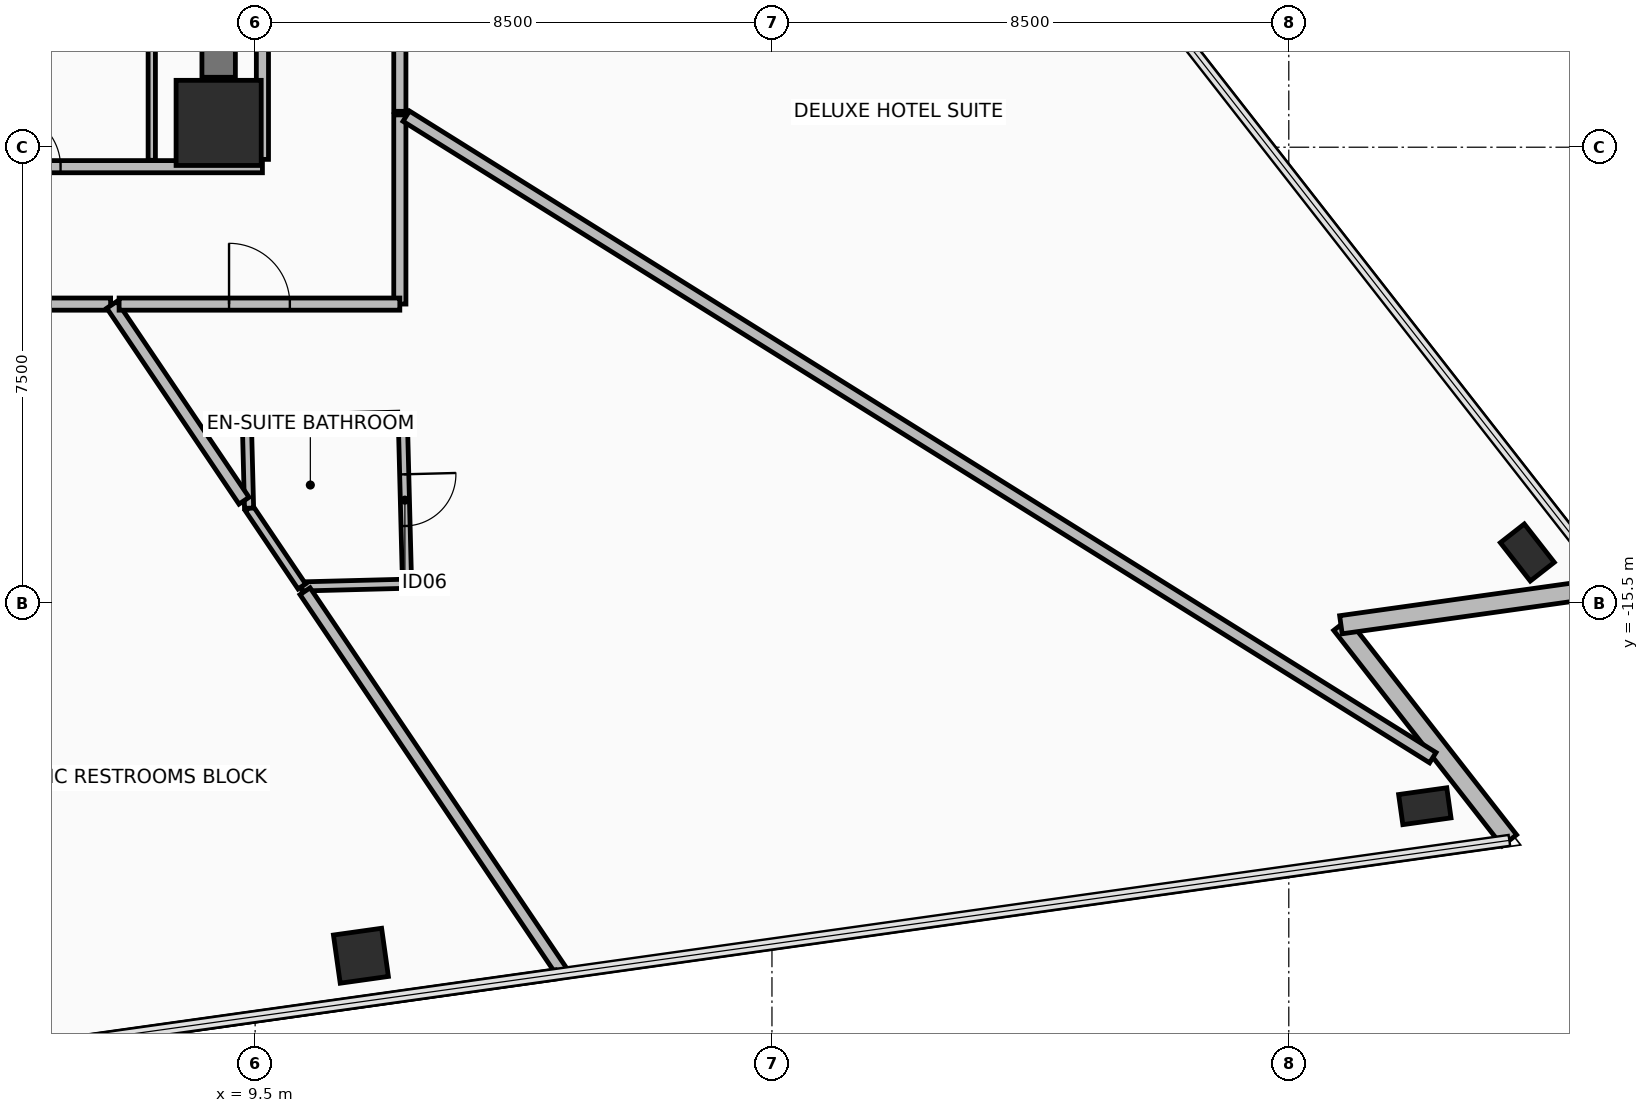
"""IFC4 building model, lengths in metres.
Left out: names, types, materials, properties, quantities, classifications, styles, units other than length and angle.
Written with IfcOpenShell. Run it as: python <this file> out.ifc"""

import sys

from ifc_helpers import new_model, si_unit, direction, frame, frame_2d, origin, origin_2d, place, context, subcontext, project, spatial, rectangle, hollow_rectangle, extrude, element, fill, save


model = new_model("IFC4")
c1 = context("Model", 3, precision=1e-05, world=origin(), true_north=direction((0.0, 1.0)))
c2 = subcontext(c1, "Body", "Model", "MODEL_VIEW")
j1 = project(units=[si_unit("LENGTHUNIT", "METRE"), si_unit("PLANEANGLEUNIT", "RADIAN")], contexts=[c1])
p1 = place(None, origin())
s1 = spatial("IfcSite", under=j1, at=p1, CompositionType="ELEMENT")
p2 = place(p1, origin())
s2 = spatial("IfcBuilding", under=s1, at=p2, CompositionType="ELEMENT")
p3 = place(p2, frame((0.0, 0.0, 77.65)))
s3 = spatial("IfcBuildingStorey", under=s2, at=p3, CompositionType="ELEMENT", Elevation=77.65)
p4 = place(p3, frame((8.9, -7.6, 0.0), z_axis=(0.0, 0.0, 1.0), x_axis=(1.0, 0.0, 0.0)))
e1 = element("IfcColumn", 1, at=p4, inside=s3, PredefinedType="COLUMN", context=c2, shape_type="SweptSolid", body=[
    extrude(rectangle(XDim=1.4, YDim=1.4, at=origin_2d()), origin(), (0.0, 0.0, 1.0), 3.45),
])
p5 = place(p3, frame((11.24, -21.296, 0.0), z_axis=(0.0, 0.0, 1.0), x_axis=(0.990268068742, 0.13917310096, 0.0)))
e2 = element("IfcColumn", 2, at=p5, inside=s3, PredefinedType="COLUMN", context=c2, shape_type="SweptSolid", body=[
    extrude(hollow_rectangle(XDim=0.8, YDim=0.8, WallThickness=0.045, at=origin_2d()), origin(), (0.0, 0.0, 1.0), 3.45),
])
for number, where, z_axis, x_axis in (
    (3, (28.737, -18.837, 0.0), (0.0, 0.0, 1.0), (0.99, 0.139, 0.0)),
    (4, (30.423, -14.665, 0.0), (0.0, 0.0, 1.0), (-0.616, 0.788, 0.0)),
):
    element("IfcColumn", number, at=place(p3, frame(where, z_axis=z_axis, x_axis=x_axis)), inside=s3, PredefinedType="COLUMN", context=c2, shape_type="SweptSolid", body=[
        extrude(hollow_rectangle(XDim=0.5, YDim=0.8, WallThickness=0.04, at=origin_2d()), origin(), (0.0, 0.0, 1.0), 3.45),
    ])
p6 = place(p3, frame((30.128, -19.399, 0.0), z_axis=(0.0, 0.0, 1.0), x_axis=(-0.615621932091, 0.78804164657, 0.0)))
e5 = element("IfcWall", 5, at=p6, inside=s3, PredefinedType="STANDARD", context=c2, shape_type="SweptSolid", body=[
    extrude(rectangle(XDim=4.5, YDim=0.3, at=frame_2d((2.25, 0.0))), origin(), (0.0, 0.0, 1.0), 2.405),
])
p7 = place(p3, frame((27.357, -15.853, 0.0), z_axis=(0.0, 0.0, 1.0), x_axis=(0.990269200152, 0.139165050317, 0.0)))
e6 = element("IfcWall", 6, at=p7, inside=s3, PredefinedType="STANDARD", context=c2, shape_type="SweptSolid", body=[
    extrude(rectangle(XDim=4.5, YDim=0.3, at=frame_2d((2.25, 0.0))), origin(), (0.0, 0.0, 1.0), 2.405),
])
p8 = place(p3, frame((8.9, -6.85, 0.0), z_axis=(0.0, 0.0, 1.0), x_axis=(0.0, 1.0, 0.0)))
e7 = element("IfcWall", 7, at=p8, inside=s3, PredefinedType="SHEAR", context=c2, shape_type="SweptSolid", body=[
    extrude(rectangle(XDim=10.7, YDim=0.55, at=frame_2d((5.35, 0.0))), origin(), (0.0, 0.0, 1.0), 3.21),
])
p9 = place(p3, frame((-9.62, -8.32, 0.0), z_axis=(0.0, 0.0, 1.0), x_axis=(1.0, 0.0, 0.0)))
e8 = element("IfcWall", 8, at=p9, inside=s3, PredefinedType="PARTITIONING", context=c2, shape_type="SweptSolid", body=[
    extrude(rectangle(XDim=19.24, YDim=0.2, at=frame_2d((9.62, 0.0))), origin(), (0.0, 0.0, 1.0), 2.605),
])
p10 = place(p9, frame((15.02, 0.0, 0.0)))
e9 = element("IfcOpeningElement", 9, at=p10, cuts=e8, PredefinedType="OPENING", context=c2, shape_type="SweptSolid", body=[
    extrude(rectangle(XDim=0.9, YDim=2.1, at=frame_2d((0.45, 1.05))), frame((0.0, 0.11, 0.0), z_axis=(0.0, -1.0, 0.0), x_axis=(1.0, 0.0, 0.0)), (0.0, 0.0, 1.0), 0.22),
])
p11 = place(p3, frame((9.62, -8.2, 0.0), z_axis=(0.0, 0.0, 1.0), x_axis=(0.0, 1.0, 0.0)))
e10 = element("IfcWall", 10, at=p11, inside=s3, PredefinedType="PARTITIONING", context=c2, shape_type="SweptSolid", body=[
    extrude(rectangle(XDim=16.4, YDim=0.2, at=frame_2d((8.2, 0.0))), origin(), (0.0, 0.0, 1.0), 2.605),
])
p12 = place(p11, frame((12.65, 0.0, 0.0)))
e11 = element("IfcOpeningElement", 11, at=p12, cuts=e10, PredefinedType="OPENING", context=c2, shape_type="SweptSolid", body=[
    extrude(rectangle(XDim=1.1, YDim=2.15, at=frame_2d((0.55, 1.075))), frame((0.0, 0.11, 0.0), z_axis=(0.0, -1.0, 0.0), x_axis=(1.0, 0.0, 0.0)), (0.0, 0.0, 1.0), 0.22),
])
p13 = place(p3, frame((7.8, -8.215, 0.0), z_axis=(0.0, 0.0, 1.0), x_axis=(0.0, 1.0, 0.0)))
e12 = element("IfcWall", 12, at=p13, inside=s3, PredefinedType="PARTITIONING", context=c2, shape_type="SweptSolid", body=[
    extrude(rectangle(XDim=4.015, YDim=0.12, at=frame_2d((2.008, 0.0))), origin(), (0.0, 0.0, 1.0), 2.405),
])
p14 = place(p3, frame((11.927, -12.429, 0.0), z_axis=(0.0, 0.0, 1.0), x_axis=(0.025746347005, -0.999668507864, 0.0)))
e13 = element("IfcWall", 13, at=p14, inside=s3, PredefinedType="PARTITIONING", context=c2, shape_type="SweptSolid", body=[
    extrude(rectangle(XDim=2.75, YDim=0.15, at=frame_2d((1.375, 0.0))), origin(), (0.0, 0.0, 1.0), 2.805),
])
p15 = place(p14, frame((0.95, 0.0, 0.0)))
e14 = element("IfcOpeningElement", 14, at=p15, cuts=e13, PredefinedType="OPENING", context=c2, shape_type="SweptSolid", body=[
    extrude(rectangle(XDim=0.85, YDim=2.1, at=frame_2d((0.425, 1.05))), frame((0.0, 0.085, 0.0), z_axis=(0.0, -1.0, 0.0), x_axis=(1.0, 0.0, 0.0)), (0.0, 0.0, 1.0), 0.17),
])
p16 = place(p3, frame((11.998, -15.178, 0.0), z_axis=(0.0, 0.0, 1.0), x_axis=(-0.999670410654, -0.025672359918, 0.0)))
e15 = element("IfcWall", 15, at=p16, inside=s3, PredefinedType="PARTITIONING", context=c2, shape_type="SweptSolid", body=[
    extrude(rectangle(XDim=1.731, YDim=0.15, at=frame_2d((0.865, 0.0))), origin(), (0.0, 0.0, 1.0), 2.605),
])
p17 = place(p3, frame((10.268, -15.223, 0.0), z_axis=(0.0, 0.0, 1.0), x_axis=(-0.559229675695, 0.82901276819, 0.0)))
e16 = element("IfcWall", 16, at=p17, inside=s3, PredefinedType="PARTITIONING", context=c2, shape_type="SweptSolid", body=[
    extrude(rectangle(XDim=1.552, YDim=0.15, at=frame_2d((0.776, 0.0))), origin(), (0.0, 0.0, 1.0), 2.605),
])
p18 = place(p3, frame((9.4, -13.936, 0.0), z_axis=(0.0, 0.0, 1.0), x_axis=(-0.025745445057, 0.999668531094, 0.0)))
e17 = element("IfcWall", 17, at=p18, inside=s3, PredefinedType="PARTITIONING", context=c2, shape_type="SweptSolid", body=[
    extrude(rectangle(XDim=1.441, YDim=0.15, at=frame_2d((0.721, 0.0))), origin(), (0.0, 0.0, 1.0), 3.21),
])
p19 = place(p3, frame((9.443, -12.493, 0.0), z_axis=(0.0, 0.0, 1.0), x_axis=(0.999667618691, 0.025780848324, 0.0)))
e18 = element("IfcWall", 18, at=p19, inside=s3, PredefinedType="PARTITIONING", context=c2, shape_type="SweptSolid", body=[
    extrude(rectangle(XDim=2.405, YDim=0.15, at=frame_2d((1.203, 0.0))), origin(), (0.0, 0.0, 1.0), 2.605),
])
p20 = place(p3, frame((1.895, -10.58, 0.0), z_axis=(0.0, 0.0, 1.0), x_axis=(1.0, 0.0, 0.0)))
e19 = element("IfcWall", 19, at=p20, inside=s3, PredefinedType="PARTITIONING", context=c2, shape_type="SweptSolid", body=[
    extrude(rectangle(XDim=5.228, YDim=0.2, at=frame_2d((2.614, 0.0))), origin(), (0.0, 0.0, 1.0), 3.21),
])
p21 = place(p20, frame((2.189, 0.0, 0.0)))
e20 = element("IfcOpeningElement", 20, at=p21, cuts=e19, PredefinedType="OPENING", context=c2, shape_type="SweptSolid", body=[
    extrude(rectangle(XDim=0.85, YDim=2.1, at=frame_2d((0.425, 1.05))), frame((0.0, 0.11, 0.0), z_axis=(0.0, -1.0, 0.0), x_axis=(1.0, 0.0, 0.0)), (0.0, 0.0, 1.0), 0.22),
])
p22 = place(p3, frame((7.144, -10.591, 0.0), z_axis=(0.0, 0.0, 1.0), x_axis=(0.559171794076, -0.829051810631, 0.0)))
e21 = element("IfcWall", 21, at=p22, inside=s3, PredefinedType="PARTITIONING", context=c2, shape_type="SweptSolid", body=[
    extrude(rectangle(XDim=3.886, YDim=0.2, at=frame_2d((1.943, 0.0))), origin(), (0.0, 0.0, 1.0), 3.21),
])
p23 = place(p3, frame((10.321, -15.302, 0.0), z_axis=(0.0, 0.0, 1.0), x_axis=(0.559202924042, -0.829030813506, 0.0)))
e22 = element("IfcWall", 22, at=p23, inside=s3, PredefinedType="PARTITIONING", context=c2, shape_type="SweptSolid", body=[
    extrude(rectangle(XDim=7.581, YDim=0.2, at=frame_2d((3.791, 0.0))), origin(), (0.0, 0.0, 1.0), 2.405),
])
p24 = place(p3, frame((14.445, -21.603, 0.0), z_axis=(0.0, 0.0, 1.0), x_axis=(-0.990270056923, -0.139158953581, 0.0)))
e23 = element("IfcWall", 23, at=p24, inside=s3, PredefinedType="PARTITIONING", context=c2, shape_type="SweptSolid", body=[
    extrude(rectangle(XDim=10.456, YDim=0.15, at=frame_2d((5.228, 0.0))), origin(), (0.0, 0.0, 1.0), 3.21),
])
p25 = place(p3, frame((11.88, -10.579, 0.0), z_axis=(0.0, 0.0, 1.0), x_axis=(0.0, 1.0, 0.0)))
e24 = element("IfcWall", 24, at=p25, inside=s3, PredefinedType="PARTITIONING", context=c2, shape_type="SweptSolid", body=[
    extrude(rectangle(XDim=3.111, YDim=0.2, at=frame_2d((1.555, 0.0))), origin(), (0.0, 0.0, 1.0), 2.605),
])
p26 = place(p3, frame((11.985, -7.489, 0.0), z_axis=(0.0, 0.0, 1.0), x_axis=(0.848049281921, -0.529917366608, 0.0)))
e25 = element("IfcWall", 25, at=p26, inside=s3, PredefinedType="PARTITIONING", context=c2, shape_type="SweptSolid", body=[
    extrude(rectangle(XDim=19.908, YDim=0.2, at=frame_2d((9.954, 0.0))), origin(), (0.0, 0.0, 1.0), 2.405),
])
p27 = place(p3, frame((7.263, -10.58, 0.0), z_axis=(0.0, 0.0, 1.0), x_axis=(1.0, 0.0, 0.0)))
e26 = element("IfcWall", 26, at=p27, inside=s3, PredefinedType="PARTITIONING", context=c2, shape_type="SweptSolid", body=[
    extrude(rectangle(XDim=4.616, YDim=0.2, at=frame_2d((2.308, 0.0))), origin(), (0.0, 0.0, 1.0), 2.605),
])
p28 = place(p27, frame((1.808, 0.0, 0.0)))
e27 = element("IfcOpeningElement", 27, at=p28, cuts=e26, PredefinedType="OPENING", context=c2, shape_type="SweptSolid", body=[
    extrude(rectangle(XDim=1.0, YDim=2.15, at=frame_2d((0.5, 1.075))), frame((0.0, 0.11, 0.0), z_axis=(0.0, -1.0, 0.0), x_axis=(1.0, 0.0, 0.0)), (0.0, 0.0, 1.0), 0.22),
])
p29 = place(p3, frame((11.88, -7.41, 0.0), z_axis=(0.0, 0.0, 1.0), x_axis=(0.0, 1.0, 0.0)))
e28 = element("IfcWall", 28, at=p29, inside=s3, PredefinedType="PARTITIONING", context=c2, shape_type="SweptSolid", body=[
    extrude(rectangle(XDim=5.711, YDim=0.2, at=frame_2d((2.855, 0.0))), origin(), (0.0, 0.0, 1.0), 2.605),
])
p30 = place(p29, frame((2.356, 0.0, 0.0)))
e29 = element("IfcOpeningElement", 29, at=p30, cuts=e28, PredefinedType="OPENING", context=c2, shape_type="SweptSolid", body=[
    extrude(rectangle(XDim=1.0, YDim=2.15, at=frame_2d((0.5, 1.075))), frame((0.0, 0.11, 0.0), z_axis=(0.0, -1.0, 0.0), x_axis=(1.0, 0.0, 0.0)), (0.0, 0.0, 1.0), 0.22),
])
p31 = place(p10, origin())
e30 = element("IfcDoor", 30, at=p31, inside=s3, OperationType="SINGLE_SWING_LEFT", PredefinedType="DOOR", context=c2, shape_type="SweptSolid", body=[
    extrude(rectangle(XDim=0.9, YDim=2.1, at=frame_2d((0.45, 1.05))), frame((0.0, 0.025, 0.0), z_axis=(0.0, -1.0, 0.0), x_axis=(1.0, 0.0, 0.0)), (0.0, 0.0, 1.0), 0.05),
])
fill(e9, e30)
p32 = place(p15, origin())
e31 = element("IfcDoor", 31, at=p32, inside=s3, OperationType="SINGLE_SWING_RIGHT", PredefinedType="DOOR", context=c2, shape_type="SweptSolid", body=[
    extrude(rectangle(XDim=0.85, YDim=2.1, at=frame_2d((0.425, 1.05))), frame((0.0, 0.025, 0.0), z_axis=(0.0, -1.0, 0.0), x_axis=(1.0, 0.0, 0.0)), (0.0, 0.0, 1.0), 0.05),
])
fill(e14, e31)
p33 = place(p28, origin())
e32 = element("IfcDoor", 32, at=p33, inside=s3, OperationType="SINGLE_SWING_LEFT", PredefinedType="DOOR", context=c2, shape_type="SweptSolid", body=[
    extrude(rectangle(XDim=1.0, YDim=2.15, at=frame_2d((0.5, 1.075))), frame((0.0, 0.025, 0.0), z_axis=(0.0, -1.0, 0.0), x_axis=(1.0, 0.0, 0.0)), (0.0, 0.0, 1.0), 0.05),
])
fill(e27, e32)
save(model, sys.argv[1])
